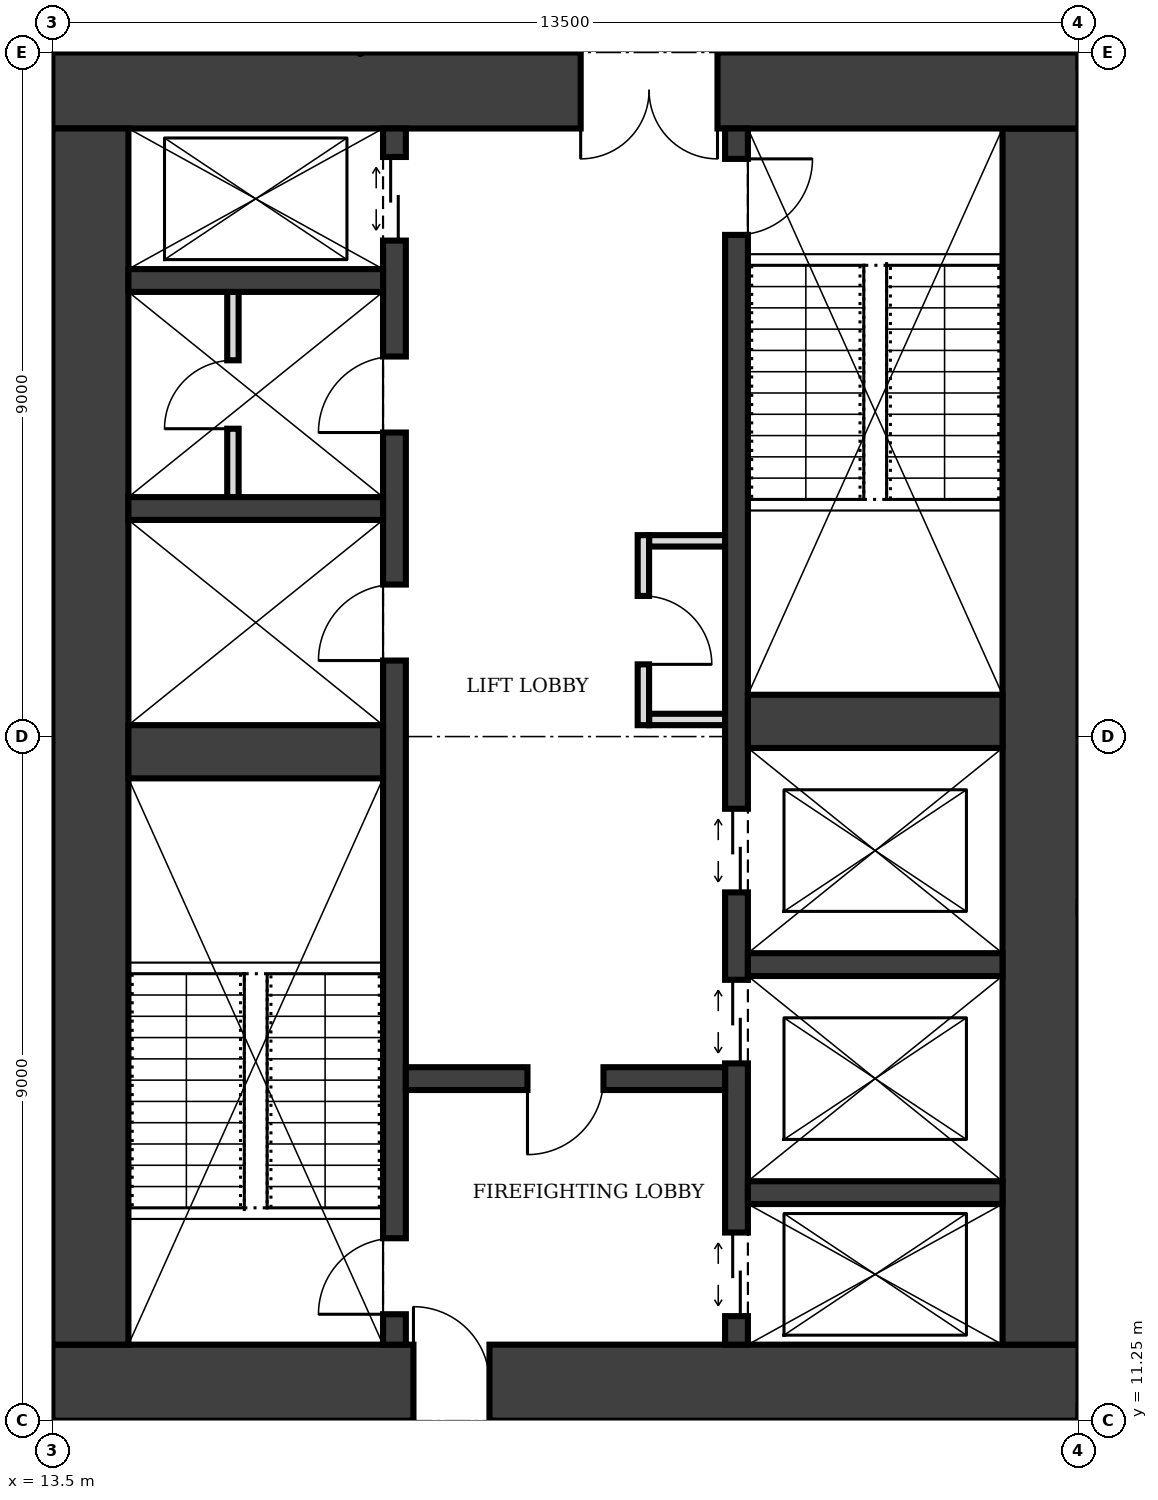
"""IFC4 building model, lengths in metres.
Left out: names, types, materials, properties, quantities, classifications, styles, units other than length and angle.
Written with IfcOpenShell. Run it as: python <this file> out.ifc"""

import sys

from ifc_helpers import new_model, si_unit, direction, frame, frame_2d, origin, place, context, subcontext, project, spatial, rectangle, extrude, element, fill, save


model = new_model("IFC4")
c1 = context("Model", 3, precision=1e-05, world=origin(), true_north=direction((0.0, 1.0)))
c2 = subcontext(c1, "Body", "Model", "MODEL_VIEW")
j1 = project(units=[si_unit("LENGTHUNIT", "METRE"), si_unit("PLANEANGLEUNIT", "RADIAN")], contexts=[c1])
p1 = place(None, origin())
s1 = spatial("IfcSite", under=j1, at=p1, CompositionType="ELEMENT")
p2 = place(p1, origin())
s2 = spatial("IfcBuilding", under=s1, at=p2, CompositionType="ELEMENT")
p3 = place(p2, frame((0.0, 0.0, 161.0)))
s3 = spatial("IfcBuildingStorey", under=s2, at=p3, CompositionType="ELEMENT", Elevation=161.0)
p4 = place(p3, frame((13.5, 11.75, 0.0), z_axis=(0.0, 0.0, 1.0), x_axis=(1.0, 0.0, 0.0)))
e1 = element("IfcWall", 1, at=p4, inside=s3, PredefinedType="SHEAR", context=c2, shape_type="SweptSolid", body=[
    extrude(rectangle(XDim=13.5, YDim=1.0, at=frame_2d((6.75, 0.0))), origin(), (0.0, 0.0, 1.0), 4.0),
])
p5 = place(p4, frame((4.75, 0.0, 0.0)))
e2 = element("IfcOpeningElement", 2, at=p5, cuts=e1, PredefinedType="OPENING", context=c2, shape_type="SweptSolid", body=[
    extrude(rectangle(XDim=1.0, YDim=2.1, at=frame_2d((0.5, 1.05))), frame((0.0, 0.51, 0.0), z_axis=(0.0, -1.0, 0.0), x_axis=(1.0, 0.0, 0.0)), (0.0, 0.0, 1.0), 1.02),
])
p6 = place(p3, frame((26.5, 12.25, 0.0), z_axis=(0.0, 0.0, 1.0), x_axis=(0.0, 1.0, 0.0)))
e3 = element("IfcWall", 3, at=p6, inside=s3, PredefinedType="SHEAR", context=c2, shape_type="SweptSolid", body=[
    extrude(rectangle(XDim=16.0, YDim=1.0, at=frame_2d((8.0, 0.0))), origin(), (0.0, 0.0, 1.0), 4.0),
])
p7 = place(p3, frame((27.0, 28.75, 0.0), z_axis=(0.0, 0.0, 1.0), x_axis=(-1.0, 0.0, 0.0)))
e4 = element("IfcWall", 4, at=p7, inside=s3, PredefinedType="SHEAR", context=c2, shape_type="SweptSolid", body=[
    extrude(rectangle(XDim=13.5, YDim=1.0, at=frame_2d((6.75, 0.0))), origin(), (0.0, 0.0, 1.0), 4.0),
])
p8 = place(p7, frame((4.75, 0.0, 0.0)))
e5 = element("IfcOpeningElement", 5, at=p8, cuts=e4, PredefinedType="OPENING", context=c2, shape_type="SweptSolid", body=[
    extrude(rectangle(XDim=1.8, YDim=2.1, at=frame_2d((0.9, 1.05))), frame((0.0, 0.51, 0.0), z_axis=(0.0, -1.0, 0.0), x_axis=(1.0, 0.0, 0.0)), (0.0, 0.0, 1.0), 1.02),
])
p9 = place(p3, frame((14.0, 28.25, 0.0), z_axis=(0.0, 0.0, 1.0), x_axis=(0.0, -1.0, 0.0)))
e6 = element("IfcWall", 6, at=p9, inside=s3, PredefinedType="SHEAR", context=c2, shape_type="SweptSolid", body=[
    extrude(rectangle(XDim=16.0, YDim=1.0, at=frame_2d((8.0, 0.0))), origin(), (0.0, 0.0, 1.0), 4.0),
])
p10 = place(p3, frame((18.0, 12.25, 0.0), z_axis=(0.0, 0.0, 1.0), x_axis=(0.0, 1.0, 0.0)))
e7 = element("IfcWall", 7, at=p10, inside=s3, PredefinedType="SHEAR", context=c2, shape_type="SweptSolid", body=[
    extrude(rectangle(XDim=16.0, YDim=0.3, at=frame_2d((8.0, 0.0))), origin(), (0.0, 0.0, 1.0), 4.0),
])
p11 = place(p10, frame((0.4, 0.0, 0.0)))
e8 = element("IfcOpeningElement", 8, at=p11, cuts=e7, PredefinedType="OPENING", context=c2, shape_type="SweptSolid", body=[
    extrude(rectangle(XDim=1.0, YDim=2.1, at=frame_2d((0.5, 1.05))), frame((0.0, 0.16, 0.0), z_axis=(0.0, -1.0, 0.0), x_axis=(1.0, 0.0, 0.0)), (0.0, 0.0, 1.0), 0.32),
])
p12 = place(p10, frame((14.525, 0.0, 0.0)))
e9 = element("IfcOpeningElement", 9, at=p12, cuts=e7, PredefinedType="OPENING", context=c2, shape_type="SweptSolid", body=[
    extrude(rectangle(XDim=1.1, YDim=2.1, at=frame_2d((0.55, 1.05))), frame((0.0, 0.16, 0.0), z_axis=(0.0, -1.0, 0.0), x_axis=(1.0, 0.0, 0.0)), (0.0, 0.0, 1.0), 0.32),
])
p13 = place(p10, frame((9.0, 0.0, 0.0)))
e10 = element("IfcOpeningElement", 10, at=p13, cuts=e7, PredefinedType="OPENING", context=c2, shape_type="SweptSolid", body=[
    extrude(rectangle(XDim=1.0, YDim=2.1, at=frame_2d((0.5, 1.05))), frame((0.0, 0.16, 0.0), z_axis=(0.0, -1.0, 0.0), x_axis=(1.0, 0.0, 0.0)), (0.0, 0.0, 1.0), 0.32),
])
p14 = place(p10, frame((12.0, 0.0, 0.0)))
e11 = element("IfcOpeningElement", 11, at=p14, cuts=e7, PredefinedType="OPENING", context=c2, shape_type="SweptSolid", body=[
    extrude(rectangle(XDim=1.0, YDim=2.1, at=frame_2d((0.5, 1.05))), frame((0.0, 0.16, 0.0), z_axis=(0.0, -1.0, 0.0), x_axis=(1.0, 0.0, 0.0)), (0.0, 0.0, 1.0), 0.32),
])
p15 = place(p3, frame((22.5, 12.25, 0.0), z_axis=(0.0, 0.0, 1.0), x_axis=(0.0, 1.0, 0.0)))
e12 = element("IfcWall", 12, at=p15, inside=s3, PredefinedType="SHEAR", context=c2, shape_type="SweptSolid", body=[
    extrude(rectangle(XDim=16.0, YDim=0.3, at=frame_2d((8.0, 0.0))), origin(), (0.0, 0.0, 1.0), 4.0),
])
p16 = place(p15, frame((14.6, 0.0, 0.0)))
e13 = element("IfcOpeningElement", 13, at=p16, cuts=e12, PredefinedType="OPENING", context=c2, shape_type="SweptSolid", body=[
    extrude(rectangle(XDim=1.0, YDim=2.1, at=frame_2d((0.5, 1.05))), frame((0.0, 0.16, 0.0), z_axis=(0.0, -1.0, 0.0), x_axis=(1.0, 0.0, 0.0)), (0.0, 0.0, 1.0), 0.32),
])
p17 = place(p15, frame((0.375, 0.0, 0.0)))
e14 = element("IfcOpeningElement", 14, at=p17, cuts=e12, PredefinedType="OPENING", context=c2, shape_type="SweptSolid", body=[
    extrude(rectangle(XDim=1.1, YDim=2.1, at=frame_2d((0.55, 1.05))), frame((0.0, 0.16, 0.0), z_axis=(0.0, -1.0, 0.0), x_axis=(1.0, 0.0, 0.0)), (0.0, 0.0, 1.0), 0.32),
])
p18 = place(p15, frame((3.7, 0.0, 0.0)))
e15 = element("IfcOpeningElement", 15, at=p18, cuts=e12, PredefinedType="OPENING", context=c2, shape_type="SweptSolid", body=[
    extrude(rectangle(XDim=1.1, YDim=2.1, at=frame_2d((0.55, 1.05))), frame((0.0, 0.16, 0.0), z_axis=(0.0, -1.0, 0.0), x_axis=(1.0, 0.0, 0.0)), (0.0, 0.0, 1.0), 0.32),
])
p19 = place(p15, frame((5.95, 0.0, 0.0)))
e16 = element("IfcOpeningElement", 16, at=p19, cuts=e12, PredefinedType="OPENING", context=c2, shape_type="SweptSolid", body=[
    extrude(rectangle(XDim=1.1, YDim=2.1, at=frame_2d((0.55, 1.05))), frame((0.0, 0.16, 0.0), z_axis=(0.0, -1.0, 0.0), x_axis=(1.0, 0.0, 0.0)), (0.0, 0.0, 1.0), 0.32),
])
p20 = place(p3, frame((14.5, 20.05, 0.0), z_axis=(0.0, 0.0, 1.0), x_axis=(1.0, 0.0, 0.0)))
e17 = element("IfcWall", 17, at=p20, inside=s3, PredefinedType="SHEAR", context=c2, shape_type="SweptSolid", body=[
    extrude(rectangle(XDim=3.35, YDim=0.7, at=frame_2d((1.675, 0.0))), origin(), (0.0, 0.0, 1.0), 4.0),
])
p21 = place(p3, frame((18.15, 15.75, 0.0), z_axis=(0.0, 0.0, 1.0), x_axis=(1.0, 0.0, 0.0)))
e18 = element("IfcWall", 18, at=p21, inside=s3, PredefinedType="SHEAR", context=c2, shape_type="SweptSolid", body=[
    extrude(rectangle(XDim=4.2, YDim=0.3, at=frame_2d((2.1, 0.0))), origin(), (0.0, 0.0, 1.0), 4.0),
])
p22 = place(p21, frame((1.6, 0.0, 0.0)))
e19 = element("IfcOpeningElement", 19, at=p22, cuts=e18, PredefinedType="OPENING", context=c2, shape_type="SweptSolid", body=[
    extrude(rectangle(XDim=1.0, YDim=2.1, at=frame_2d((0.5, 1.05))), frame((0.0, 0.16, 0.0), z_axis=(0.0, -1.0, 0.0), x_axis=(1.0, 0.0, 0.0)), (0.0, 0.0, 1.0), 0.32),
])
for number, where, z_axis, x_axis in (
    (20, (22.65, 14.25, 0.0), (0.0, 0.0, 1.0), (1.0, 0.0, 0.0)),
    (21, (22.65, 17.25, 0.0), (0.0, 0.0, 1.0), (1.0, 0.0, 0.0)),
):
    element("IfcWall", number, at=place(p3, frame(where, z_axis=z_axis, x_axis=x_axis)), inside=s3, PredefinedType="SHEAR", context=c2, shape_type="SweptSolid", body=[
        extrude(rectangle(XDim=3.35, YDim=0.3, at=frame_2d((1.675, 0.0))), origin(), (0.0, 0.0, 1.0), 4.0),
    ])
p23 = place(p3, frame((22.65, 20.45, 0.0), z_axis=(0.0, 0.0, 1.0), x_axis=(1.0, 0.0, 0.0)))
e22 = element("IfcWall", 22, at=p23, inside=s3, PredefinedType="SHEAR", context=c2, shape_type="SweptSolid", body=[
    extrude(rectangle(XDim=3.35, YDim=0.7, at=frame_2d((1.675, 0.0))), origin(), (0.0, 0.0, 1.0), 4.0),
])
for number, where, z_axis, x_axis in (
    (23, (14.5, 23.25, 0.0), (0.0, 0.0, 1.0), (1.0, 0.0, 0.0)),
    (24, (14.5, 26.25, 0.0), (0.0, 0.0, 1.0), (1.0, 0.0, 0.0)),
):
    element("IfcWall", number, at=place(p3, frame(where, z_axis=z_axis, x_axis=x_axis)), inside=s3, PredefinedType="SHEAR", context=c2, shape_type="SweptSolid", body=[
        extrude(rectangle(XDim=3.35, YDim=0.3, at=frame_2d((1.675, 0.0))), origin(), (0.0, 0.0, 1.0), 4.0),
    ])
p24 = place(p3, frame((21.275, 20.4, 0.0), z_axis=(0.0, 0.0, 1.0), x_axis=(0.0, 1.0, 0.0)))
e25 = element("IfcWall", 25, at=p24, inside=s3, PredefinedType="PARTITIONING", context=c2, shape_type="SweptSolid", body=[
    extrude(rectangle(XDim=2.5, YDim=0.15, at=frame_2d((1.25, 0.0))), origin(), (0.0, 0.0, 1.0), 3.75),
])
p25 = place(p24, frame((0.8, 0.0, 0.0)))
e26 = element("IfcOpeningElement", 26, at=p25, cuts=e25, PredefinedType="OPENING", context=c2, shape_type="SweptSolid", body=[
    extrude(rectangle(XDim=0.9, YDim=2.1, at=frame_2d((0.45, 1.05))), frame((0.0, 0.085, 0.0), z_axis=(0.0, -1.0, 0.0), x_axis=(1.0, 0.0, 0.0)), (0.0, 0.0, 1.0), 0.17),
])
for number, where, z_axis, x_axis in (
    (27, (21.35, 20.475, 0.0), (0.0, 0.0, 1.0), (1.0, 0.0, 0.0)),
    (28, (21.35, 22.825, 0.0), (0.0, 0.0, 1.0), (1.0, 0.0, 0.0)),
):
    element("IfcWall", number, at=place(p3, frame(where, z_axis=z_axis, x_axis=x_axis)), inside=s3, PredefinedType="PARTITIONING", context=c2, shape_type="SweptSolid", body=[
        extrude(rectangle(XDim=1.0, YDim=0.15, at=frame_2d((0.5, 0.0))), origin(), (0.0, 0.0, 1.0), 3.75),
    ])
p26 = place(p3, frame((15.875, 23.4, 0.0), z_axis=(0.0, 0.0, 1.0), x_axis=(0.0, 1.0, 0.0)))
e29 = element("IfcWall", 29, at=p26, inside=s3, PredefinedType="PARTITIONING", context=c2, shape_type="SweptSolid", body=[
    extrude(rectangle(XDim=2.7, YDim=0.15, at=frame_2d((1.35, 0.0))), origin(), (0.0, 0.0, 1.0), 3.75),
])
p27 = place(p26, frame((0.9, 0.0, 0.0)))
e30 = element("IfcOpeningElement", 30, at=p27, cuts=e29, PredefinedType="OPENING", context=c2, shape_type="SweptSolid", body=[
    extrude(rectangle(XDim=0.9, YDim=2.1, at=frame_2d((0.45, 1.05))), frame((0.0, 0.085, 0.0), z_axis=(0.0, -1.0, 0.0), x_axis=(1.0, 0.0, 0.0)), (0.0, 0.0, 1.0), 0.17),
])
for number, where, z_axis, x_axis in (
    (31, (27.0, 11.35, 0.0), (0.0, 0.0, 1.0), (1.0, 0.0, 0.0)),
    (32, (27.0, 29.15, 0.0), (0.0, 0.0, 1.0), (1.0, 0.0, 0.0)),
):
    element("IfcWall", number, at=place(p3, frame(where, z_axis=z_axis, x_axis=x_axis)), inside=s3, PredefinedType="SOLIDWALL", context=c2, shape_type="SweptSolid", body=[
        extrude(rectangle(XDim=7.93, YDim=0.2, at=frame_2d((3.965, 0.0))), origin(), (0.0, 0.0, 1.0), 2.85),
    ])
p28 = place(p5, origin())
e33 = element("IfcDoor", 33, at=p28, inside=s3, OperationType="SINGLE_SWING_LEFT", PredefinedType="DOOR", context=c2, shape_type="SweptSolid", body=[
    extrude(rectangle(XDim=1.0, YDim=2.1, at=frame_2d((0.5, 1.05))), frame((0.0, 0.025, 0.0), z_axis=(0.0, -1.0, 0.0), x_axis=(1.0, 0.0, 0.0)), (0.0, 0.0, 1.0), 0.05),
])
fill(e2, e33)
p29 = place(p8, origin())
e34 = element("IfcDoor", 34, at=p29, inside=s3, OperationType="DOUBLE_DOOR_SINGLE_SWING", PredefinedType="DOOR", context=c2, shape_type="SweptSolid", body=[
    extrude(rectangle(XDim=1.8, YDim=2.1, at=frame_2d((0.9, 1.05))), frame((0.0, 0.025, 0.0), z_axis=(0.0, -1.0, 0.0), x_axis=(1.0, 0.0, 0.0)), (0.0, 0.0, 1.0), 0.05),
])
fill(e5, e34)
p30 = place(p22, frame((1.0, 0.0, 0.0), z_axis=(0.0, 0.0, 1.0), x_axis=(-1.0, 0.0, 0.0)))
e35 = element("IfcDoor", 35, at=p30, inside=s3, OperationType="SINGLE_SWING_RIGHT", PredefinedType="DOOR", context=c2, shape_type="SweptSolid", body=[
    extrude(rectangle(XDim=1.0, YDim=2.1, at=frame_2d((0.5, 1.05))), frame((0.0, 0.025, 0.0), z_axis=(0.0, -1.0, 0.0), x_axis=(1.0, 0.0, 0.0)), (0.0, 0.0, 1.0), 0.05),
])
fill(e19, e35)
p31 = place(p11, origin())
e36 = element("IfcDoor", 36, at=p31, inside=s3, OperationType="SINGLE_SWING_LEFT", PredefinedType="DOOR", context=c2, shape_type="SweptSolid", body=[
    extrude(rectangle(XDim=1.0, YDim=2.1, at=frame_2d((0.5, 1.05))), frame((0.0, 0.025, 0.0), z_axis=(0.0, -1.0, 0.0), x_axis=(1.0, 0.0, 0.0)), (0.0, 0.0, 1.0), 0.05),
])
fill(e8, e36)
p32 = place(p16, frame((1.0, 0.0, 0.0), z_axis=(0.0, 0.0, 1.0), x_axis=(-1.0, 0.0, 0.0)))
e37 = element("IfcDoor", 37, at=p32, inside=s3, OperationType="SINGLE_SWING_LEFT", PredefinedType="DOOR", context=c2, shape_type="SweptSolid", body=[
    extrude(rectangle(XDim=1.0, YDim=2.1, at=frame_2d((0.5, 1.05))), frame((0.0, 0.025, 0.0), z_axis=(0.0, -1.0, 0.0), x_axis=(1.0, 0.0, 0.0)), (0.0, 0.0, 1.0), 0.05),
])
fill(e13, e37)
p33 = place(p17, origin())
e38 = element("IfcDoor", 38, at=p33, inside=s3, OperationType="DOUBLE_DOOR_SLIDING", PredefinedType="DOOR", context=c2, shape_type="SweptSolid", body=[
    extrude(rectangle(XDim=1.1, YDim=2.1, at=frame_2d((0.55, 1.05))), frame((0.0, 0.025, 0.0), z_axis=(0.0, -1.0, 0.0), x_axis=(1.0, 0.0, 0.0)), (0.0, 0.0, 1.0), 0.05),
])
fill(e14, e38)
p34 = place(p12, origin())
e39 = element("IfcDoor", 39, at=p34, inside=s3, OperationType="DOUBLE_DOOR_SLIDING", PredefinedType="DOOR", context=c2, shape_type="SweptSolid", body=[
    extrude(rectangle(XDim=1.1, YDim=2.1, at=frame_2d((0.55, 1.05))), frame((0.0, 0.025, 0.0), z_axis=(0.0, -1.0, 0.0), x_axis=(1.0, 0.0, 0.0)), (0.0, 0.0, 1.0), 0.05),
])
fill(e9, e39)
p35 = place(p18, origin())
e40 = element("IfcDoor", 40, at=p35, inside=s3, OperationType="DOUBLE_DOOR_SLIDING", PredefinedType="DOOR", context=c2, shape_type="SweptSolid", body=[
    extrude(rectangle(XDim=1.1, YDim=2.1, at=frame_2d((0.55, 1.05))), frame((0.0, 0.025, 0.0), z_axis=(0.0, -1.0, 0.0), x_axis=(1.0, 0.0, 0.0)), (0.0, 0.0, 1.0), 0.05),
])
fill(e15, e40)
p36 = place(p19, origin())
e41 = element("IfcDoor", 41, at=p36, inside=s3, OperationType="DOUBLE_DOOR_SLIDING", PredefinedType="DOOR", context=c2, shape_type="SweptSolid", body=[
    extrude(rectangle(XDim=1.1, YDim=2.1, at=frame_2d((0.55, 1.05))), frame((0.0, 0.025, 0.0), z_axis=(0.0, -1.0, 0.0), x_axis=(1.0, 0.0, 0.0)), (0.0, 0.0, 1.0), 0.05),
])
fill(e16, e41)
p37 = place(p25, frame((0.9, 0.0, 0.0), z_axis=(0.0, 0.0, 1.0), x_axis=(-1.0, 0.0, 0.0)))
e42 = element("IfcDoor", 42, at=p37, inside=s3, OperationType="SINGLE_SWING_RIGHT", PredefinedType="DOOR", context=c2, shape_type="SweptSolid", body=[
    extrude(rectangle(XDim=0.9, YDim=2.1, at=frame_2d((0.45, 1.05))), frame((0.0, 0.025, 0.0), z_axis=(0.0, -1.0, 0.0), x_axis=(1.0, 0.0, 0.0)), (0.0, 0.0, 1.0), 0.05),
])
fill(e26, e42)
p38 = place(p13, origin())
e43 = element("IfcDoor", 43, at=p38, inside=s3, OperationType="SINGLE_SWING_LEFT", PredefinedType="DOOR", context=c2, shape_type="SweptSolid", body=[
    extrude(rectangle(XDim=1.0, YDim=2.1, at=frame_2d((0.5, 1.05))), frame((0.0, 0.025, 0.0), z_axis=(0.0, -1.0, 0.0), x_axis=(1.0, 0.0, 0.0)), (0.0, 0.0, 1.0), 0.05),
])
fill(e10, e43)
p39 = place(p14, origin())
e44 = element("IfcDoor", 44, at=p39, inside=s3, OperationType="SINGLE_SWING_LEFT", PredefinedType="DOOR", context=c2, shape_type="SweptSolid", body=[
    extrude(rectangle(XDim=1.0, YDim=2.1, at=frame_2d((0.5, 1.05))), frame((0.0, 0.025, 0.0), z_axis=(0.0, -1.0, 0.0), x_axis=(1.0, 0.0, 0.0)), (0.0, 0.0, 1.0), 0.05),
])
fill(e11, e44)
p40 = place(p27, origin())
e45 = element("IfcDoor", 45, at=p40, inside=s3, OperationType="SINGLE_SWING_LEFT", PredefinedType="DOOR", context=c2, shape_type="SweptSolid", body=[
    extrude(rectangle(XDim=0.9, YDim=2.1, at=frame_2d((0.45, 1.05))), frame((0.0, 0.025, 0.0), z_axis=(0.0, -1.0, 0.0), x_axis=(1.0, 0.0, 0.0)), (0.0, 0.0, 1.0), 0.05),
])
fill(e30, e45)
save(model, sys.argv[1])
